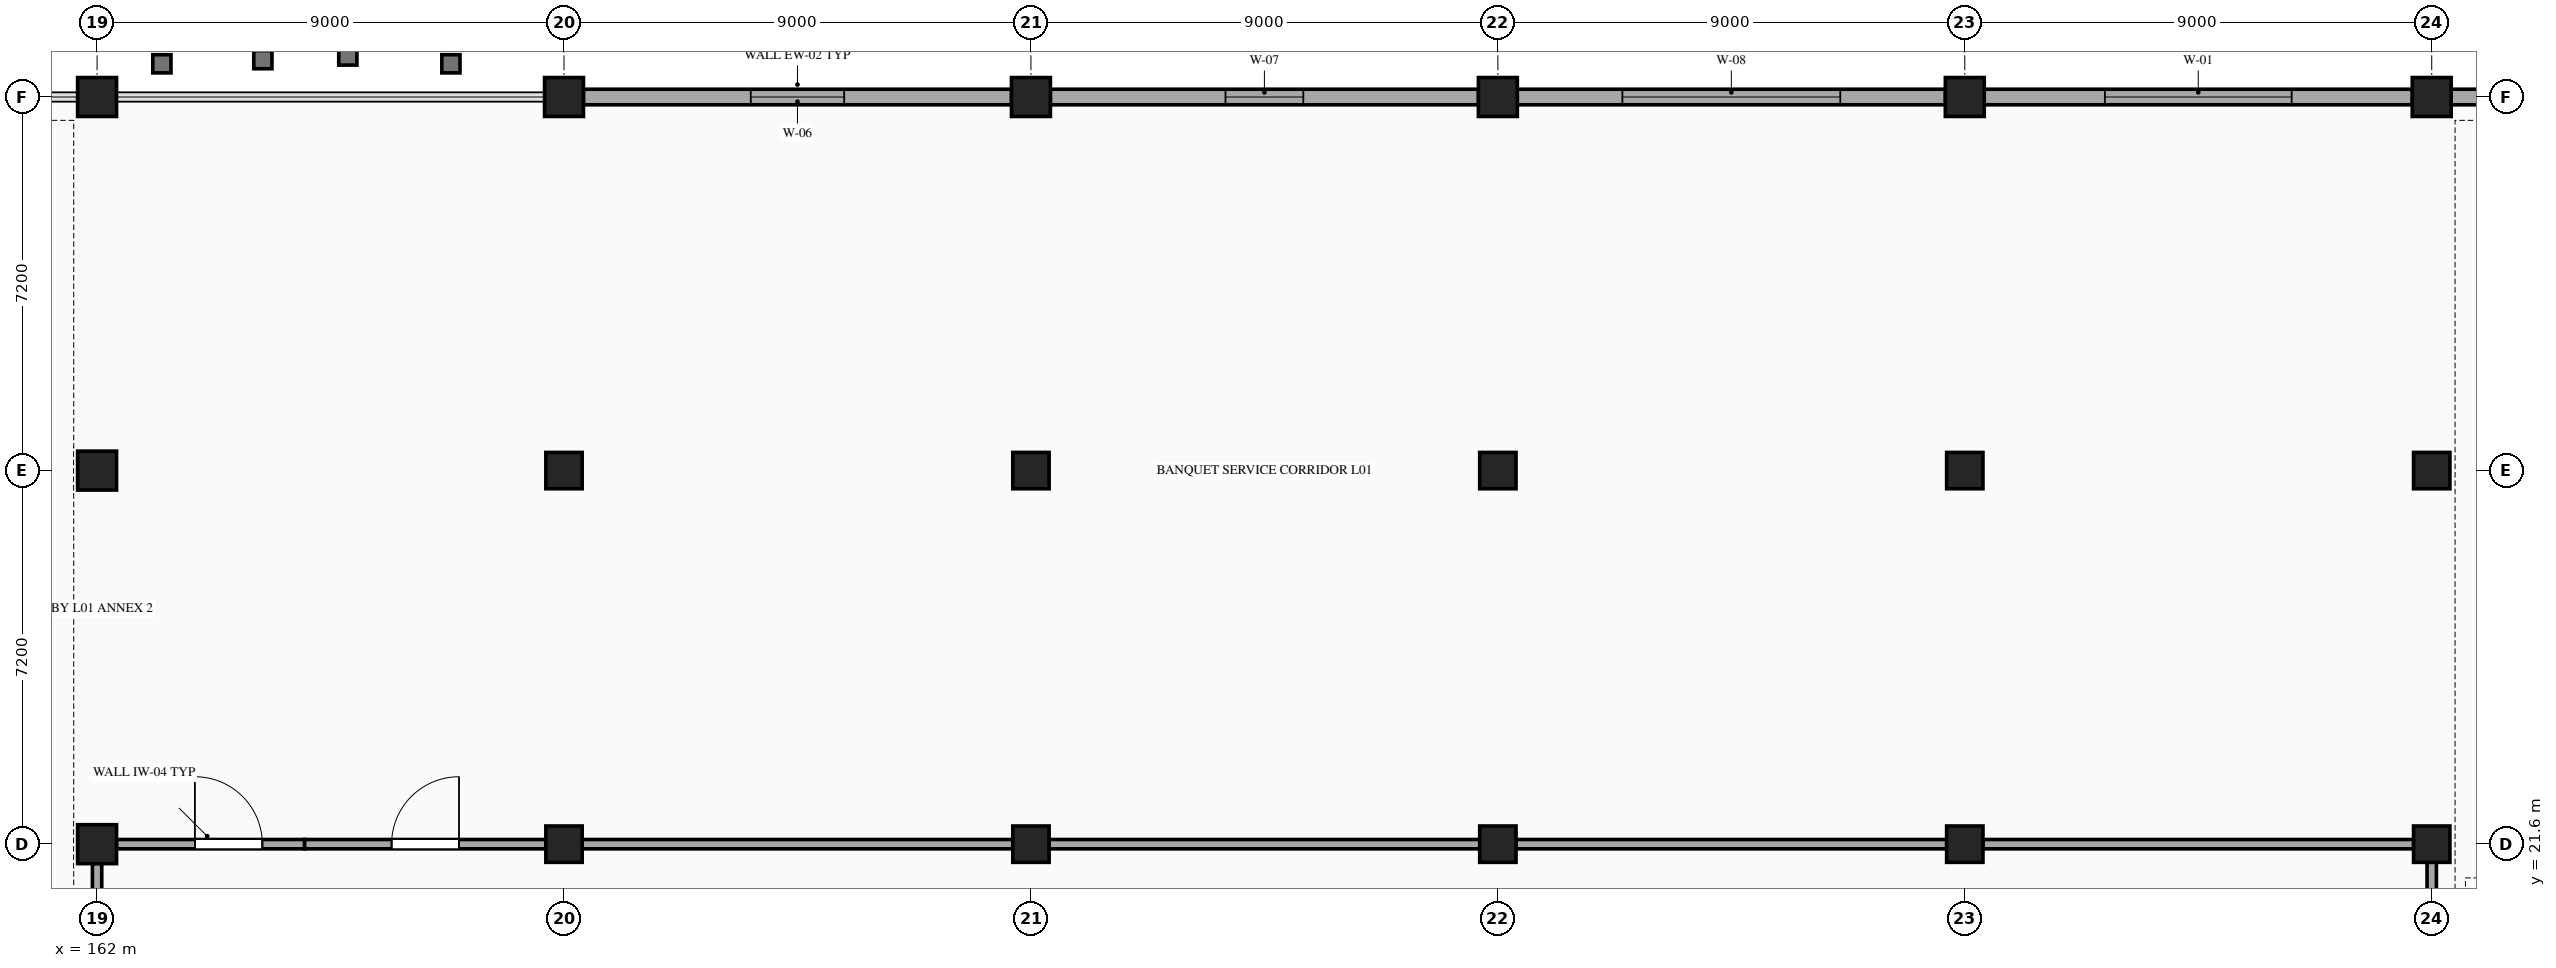
"""IFC4 building model, lengths in metres.
Left out: names, types, materials, properties, quantities, classifications, styles, units other than length and angle.
Written with IfcOpenShell. Run it as: python <this file> out.ifc"""

import sys

from ifc_helpers import new_model, si_unit, direction, frame, frame_2d, origin, origin_2d, place, context, subcontext, project, spatial, rectangle, extrude, element, fill, save


model = new_model("IFC4")
c1 = context("Model", 3, precision=1e-05, world=origin(), true_north=direction((0.0, 1.0)))
c2 = subcontext(c1, "Body", "Model", "MODEL_VIEW")
j1 = project(units=[si_unit("LENGTHUNIT", "METRE"), si_unit("PLANEANGLEUNIT", "RADIAN")], contexts=[c1])
p1 = place(None, origin())
s1 = spatial("IfcSite", under=j1, at=p1, CompositionType="ELEMENT")
p2 = place(p1, origin())
s2 = spatial("IfcBuilding", under=s1, at=p2, CompositionType="ELEMENT")
p3 = place(p2, frame((0.0, 0.0, 5.4)))
s3 = spatial("IfcBuildingStorey", under=s2, at=p3, CompositionType="ELEMENT", Elevation=5.4)
for number, where, z_axis, x_axis in (
    (1, (162.0, 21.6, 0.0), (0.0, 0.0, 1.0), (1.0, 0.0, 0.0)),
    (2, (162.0, 28.8, 0.0), (0.0, 0.0, 1.0), (1.0, 0.0, 0.0)),
    (3, (162.0, 36.0, 0.0), (0.0, 0.0, 1.0), (1.0, 0.0, 0.0)),
):
    element("IfcColumn", number, at=place(p3, frame(where, z_axis=z_axis, x_axis=x_axis)), inside=s3, PredefinedType="COLUMN", context=c2, shape_type="SweptSolid", body=[
        extrude(rectangle(XDim=0.75, YDim=0.75, at=origin_2d()), origin(), (0.0, 0.0, 1.0), 5.4),
    ])
for number, where, z_axis, x_axis in (
    (4, (171.0, 21.6, 0.0), (0.0, 0.0, 1.0), (1.0, 0.0, 0.0)),
    (5, (171.0, 28.8, 0.0), (0.0, 0.0, 1.0), (1.0, 0.0, 0.0)),
):
    element("IfcColumn", number, at=place(p3, frame(where, z_axis=z_axis, x_axis=x_axis)), inside=s3, PredefinedType="COLUMN", context=c2, shape_type="SweptSolid", body=[
        extrude(rectangle(XDim=0.7, YDim=0.7, at=origin_2d()), origin(), (0.0, 0.0, 1.0), 5.4),
    ])
p4 = place(p3, frame((171.0, 36.0, 0.0), z_axis=(0.0, 0.0, 1.0), x_axis=(1.0, 0.0, 0.0)))
e6 = element("IfcColumn", 6, at=p4, inside=s3, PredefinedType="COLUMN", context=c2, shape_type="SweptSolid", body=[
    extrude(rectangle(XDim=0.75, YDim=0.75, at=origin_2d()), origin(), (0.0, 0.0, 1.0), 5.4),
])
for number, where, z_axis, x_axis in (
    (7, (180.0, 21.6, 0.0), (0.0, 0.0, 1.0), (1.0, 0.0, 0.0)),
    (8, (180.0, 28.8, 0.0), (0.0, 0.0, 1.0), (1.0, 0.0, 0.0)),
):
    element("IfcColumn", number, at=place(p3, frame(where, z_axis=z_axis, x_axis=x_axis)), inside=s3, PredefinedType="COLUMN", context=c2, shape_type="SweptSolid", body=[
        extrude(rectangle(XDim=0.7, YDim=0.7, at=origin_2d()), origin(), (0.0, 0.0, 1.0), 5.4),
    ])
p5 = place(p3, frame((180.0, 36.0, 0.0), z_axis=(0.0, 0.0, 1.0), x_axis=(1.0, 0.0, 0.0)))
e9 = element("IfcColumn", 9, at=p5, inside=s3, PredefinedType="COLUMN", context=c2, shape_type="SweptSolid", body=[
    extrude(rectangle(XDim=0.75, YDim=0.75, at=origin_2d()), origin(), (0.0, 0.0, 1.0), 5.4),
])
for number, where, z_axis, x_axis in (
    (10, (189.0, 21.6, 0.0), (0.0, 0.0, 1.0), (1.0, 0.0, 0.0)),
    (11, (189.0, 28.8, 0.0), (0.0, 0.0, 1.0), (1.0, 0.0, 0.0)),
):
    element("IfcColumn", number, at=place(p3, frame(where, z_axis=z_axis, x_axis=x_axis)), inside=s3, PredefinedType="COLUMN", context=c2, shape_type="SweptSolid", body=[
        extrude(rectangle(XDim=0.7, YDim=0.7, at=origin_2d()), origin(), (0.0, 0.0, 1.0), 5.4),
    ])
p6 = place(p3, frame((189.0, 36.0, 0.0), z_axis=(0.0, 0.0, 1.0), x_axis=(1.0, 0.0, 0.0)))
e12 = element("IfcColumn", 12, at=p6, inside=s3, PredefinedType="COLUMN", context=c2, shape_type="SweptSolid", body=[
    extrude(rectangle(XDim=0.75, YDim=0.75, at=origin_2d()), origin(), (0.0, 0.0, 1.0), 5.4),
])
for number, where, z_axis, x_axis in (
    (13, (198.0, 21.6, 0.0), (0.0, 0.0, 1.0), (1.0, 0.0, 0.0)),
    (14, (198.0, 28.8, 0.0), (0.0, 0.0, 1.0), (1.0, 0.0, 0.0)),
):
    element("IfcColumn", number, at=place(p3, frame(where, z_axis=z_axis, x_axis=x_axis)), inside=s3, PredefinedType="COLUMN", context=c2, shape_type="SweptSolid", body=[
        extrude(rectangle(XDim=0.7, YDim=0.7, at=origin_2d()), origin(), (0.0, 0.0, 1.0), 5.4),
    ])
p7 = place(p3, frame((198.0, 36.0, 0.0), z_axis=(0.0, 0.0, 1.0), x_axis=(1.0, 0.0, 0.0)))
e15 = element("IfcColumn", 15, at=p7, inside=s3, PredefinedType="COLUMN", context=c2, shape_type="SweptSolid", body=[
    extrude(rectangle(XDim=0.75, YDim=0.75, at=origin_2d()), origin(), (0.0, 0.0, 1.0), 5.4),
])
for number, where, z_axis, x_axis in (
    (16, (207.0, 21.6, 0.0), (0.0, 0.0, 1.0), (1.0, 0.0, 0.0)),
    (17, (207.0, 28.8, 0.0), (0.0, 0.0, 1.0), (1.0, 0.0, 0.0)),
):
    element("IfcColumn", number, at=place(p3, frame(where, z_axis=z_axis, x_axis=x_axis)), inside=s3, PredefinedType="COLUMN", context=c2, shape_type="SweptSolid", body=[
        extrude(rectangle(XDim=0.7, YDim=0.7, at=origin_2d()), origin(), (0.0, 0.0, 1.0), 5.4),
    ])
p8 = place(p3, frame((207.0, 36.0, 0.0), z_axis=(0.0, 0.0, 1.0), x_axis=(1.0, 0.0, 0.0)))
e18 = element("IfcColumn", 18, at=p8, inside=s3, PredefinedType="COLUMN", context=c2, shape_type="SweptSolid", body=[
    extrude(rectangle(XDim=0.75, YDim=0.75, at=origin_2d()), origin(), (0.0, 0.0, 1.0), 5.4),
])
p9 = place(p3, frame((171.373, 36.0, 0.0), z_axis=(0.0, 0.0, 1.0), x_axis=(1.0, 0.0, 0.0)))
e19 = element("IfcWall", 19, at=p9, inside=s3, PredefinedType="STANDARD", context=c2, shape_type="SweptSolid", body=[
    extrude(rectangle(XDim=8.254, YDim=0.3, at=frame_2d((4.127, 0.0))), origin(), (0.0, 0.0, 1.0), 4.764),
])
p10 = place(p9, frame((3.227, 0.0, 0.9)))
e20 = element("IfcOpeningElement", 20, at=p10, cuts=e19, PredefinedType="OPENING", context=c2, shape_type="SweptSolid", body=[
    extrude(rectangle(XDim=1.8, YDim=1.8, at=frame_2d((0.9, 0.9))), frame((0.0, 0.16, 0.0), z_axis=(0.0, -1.0, 0.0), x_axis=(1.0, 0.0, 0.0)), (0.0, 0.0, 1.0), 0.32),
])
p11 = place(p3, frame((180.373, 36.0, 0.0), z_axis=(0.0, 0.0, 1.0), x_axis=(1.0, 0.0, 0.0)))
e21 = element("IfcWall", 21, at=p11, inside=s3, PredefinedType="STANDARD", context=c2, shape_type="SweptSolid", body=[
    extrude(rectangle(XDim=8.254, YDim=0.3, at=frame_2d((4.127, 0.0))), origin(), (0.0, 0.0, 1.0), 4.764),
])
p12 = place(p11, frame((3.377, 0.0, 0.9)))
e22 = element("IfcOpeningElement", 22, at=p12, cuts=e21, PredefinedType="OPENING", context=c2, shape_type="SweptSolid", body=[
    extrude(rectangle(XDim=1.5, YDim=1.6, at=frame_2d((0.75, 0.8))), frame((0.0, 0.16, 0.0), z_axis=(0.0, -1.0, 0.0), x_axis=(1.0, 0.0, 0.0)), (0.0, 0.0, 1.0), 0.32),
])
p13 = place(p3, frame((189.373, 36.0, 0.0), z_axis=(0.0, 0.0, 1.0), x_axis=(1.0, 0.0, 0.0)))
e23 = element("IfcWall", 23, at=p13, inside=s3, PredefinedType="STANDARD", context=c2, shape_type="SweptSolid", body=[
    extrude(rectangle(XDim=8.254, YDim=0.3, at=frame_2d((4.127, 0.0))), origin(), (0.0, 0.0, 1.0), 4.764),
])
p14 = place(p13, frame((2.027, 0.0, 0.9)))
e24 = element("IfcOpeningElement", 24, at=p14, cuts=e23, PredefinedType="OPENING", context=c2, shape_type="SweptSolid", body=[
    extrude(rectangle(XDim=4.2, YDim=1.5, at=frame_2d((2.1, 0.75))), frame((0.0, 0.16, 0.0), z_axis=(0.0, -1.0, 0.0), x_axis=(1.0, 0.0, 0.0)), (0.0, 0.0, 1.0), 0.32),
])
p15 = place(p3, frame((198.373, 36.0, 0.0), z_axis=(0.0, 0.0, 1.0), x_axis=(1.0, 0.0, 0.0)))
e25 = element("IfcWall", 25, at=p15, inside=s3, PredefinedType="STANDARD", context=c2, shape_type="SweptSolid", body=[
    extrude(rectangle(XDim=8.254, YDim=0.3, at=frame_2d((4.127, 0.0))), origin(), (0.0, 0.0, 1.0), 4.764),
])
p16 = place(p15, frame((2.327, 0.0, 0.9)))
e26 = element("IfcOpeningElement", 26, at=p16, cuts=e25, PredefinedType="OPENING", context=c2, shape_type="SweptSolid", body=[
    extrude(rectangle(XDim=3.6, YDim=2.1, at=frame_2d((1.8, 1.05))), frame((0.0, 0.16, 0.0), z_axis=(0.0, -1.0, 0.0), x_axis=(1.0, 0.0, 0.0)), (0.0, 0.0, 1.0), 0.32),
])
p17 = place(p3, frame((207.373, 36.0, 0.0), z_axis=(0.0, 0.0, 1.0), x_axis=(1.0, 0.0, 0.0)))
e27 = element("IfcWall", 27, at=p17, inside=s3, PredefinedType="STANDARD", context=c2, shape_type="SweptSolid", body=[
    extrude(rectangle(XDim=8.254, YDim=0.3, at=frame_2d((4.127, 0.0))), origin(), (0.0, 0.0, 1.0), 4.764),
])
p18 = place(p17, frame((2.627, 0.0, 0.9)))
e28 = element("IfcOpeningElement", 28, at=p18, cuts=e27, PredefinedType="OPENING", context=c2, shape_type="SweptSolid", body=[
    extrude(rectangle(XDim=3.0, YDim=2.1, at=frame_2d((1.5, 1.05))), frame((0.0, 0.16, 0.0), z_axis=(0.0, -1.0, 0.0), x_axis=(1.0, 0.0, 0.0)), (0.0, 0.0, 1.0), 0.32),
])
p19 = place(p3, frame((162.373, 21.6, 0.0), z_axis=(0.0, 0.0, 1.0), x_axis=(1.0, 0.0, 0.0)))
e29 = element("IfcWall", 29, at=p19, inside=s3, PredefinedType="PARTITIONING", context=c2, shape_type="SweptSolid", body=[
    extrude(rectangle(XDim=3.627, YDim=0.18, at=frame_2d((1.813, 0.0))), origin(), (0.0, 0.0, 1.0), 4.264),
])
p20 = place(p19, frame((1.513, 0.0, 0.0)))
e30 = element("IfcOpeningElement", 30, at=p20, cuts=e29, PredefinedType="OPENING", context=c2, shape_type="SweptSolid", body=[
    extrude(rectangle(XDim=1.3, YDim=2.2, at=frame_2d((0.65, 1.1))), frame((0.0, 0.1, 0.0), z_axis=(0.0, -1.0, 0.0), x_axis=(1.0, 0.0, 0.0)), (0.0, 0.0, 1.0), 0.2),
])
p21 = place(p3, frame((166.0, 21.6, 0.0), z_axis=(0.0, 0.0, 1.0), x_axis=(1.0, 0.0, 0.0)))
e31 = element("IfcWall", 31, at=p21, inside=s3, PredefinedType="PARTITIONING", context=c2, shape_type="SweptSolid", body=[
    extrude(rectangle(XDim=4.652, YDim=0.18, at=frame_2d((2.326, 0.0))), origin(), (0.0, 0.0, 1.0), 4.264),
])
p22 = place(p21, frame((1.676, 0.0, 0.0)))
e32 = element("IfcOpeningElement", 32, at=p22, cuts=e31, PredefinedType="OPENING", context=c2, shape_type="SweptSolid", body=[
    extrude(rectangle(XDim=1.3, YDim=2.2, at=frame_2d((0.65, 1.1))), frame((0.0, 0.1, 0.0), z_axis=(0.0, -1.0, 0.0), x_axis=(1.0, 0.0, 0.0)), (0.0, 0.0, 1.0), 0.2),
])
for number, where, z_axis, x_axis in (
    (33, (171.348, 21.6, 0.0), (0.0, 0.0, 1.0), (1.0, 0.0, 0.0)),
    (34, (180.348, 21.6, 0.0), (0.0, 0.0, 1.0), (1.0, 0.0, 0.0)),
    (35, (189.348, 21.6, 0.0), (0.0, 0.0, 1.0), (1.0, 0.0, 0.0)),
    (36, (198.348, 21.6, 0.0), (0.0, 0.0, 1.0), (1.0, 0.0, 0.0)),
):
    element("IfcWall", number, at=place(p3, frame(where, z_axis=z_axis, x_axis=x_axis)), inside=s3, PredefinedType="PARTITIONING", context=c2, shape_type="SweptSolid", body=[
        extrude(rectangle(XDim=8.304, YDim=0.18, at=frame_2d((4.152, 0.0))), origin(), (0.0, 0.0, 1.0), 4.264),
    ])
p23 = place(p3, frame((162.0, 14.773, 0.0), z_axis=(0.0, 0.0, 1.0), x_axis=(0.0, 1.0, 0.0)))
e37 = element("IfcWall", 37, at=p23, inside=s3, PredefinedType="PARTITIONING", context=c2, shape_type="SweptSolid", body=[
    extrude(rectangle(XDim=6.454, YDim=0.18, at=frame_2d((3.227, 0.0))), origin(), (0.0, 0.0, 1.0), 4.264),
])
p24 = place(p3, frame((207.0, 14.748, 0.0), z_axis=(0.0, 0.0, 1.0), x_axis=(0.0, 1.0, 0.0)))
e38 = element("IfcWall", 38, at=p24, inside=s3, PredefinedType="PARTITIONING", context=c2, shape_type="SweptSolid", body=[
    extrude(rectangle(XDim=6.504, YDim=0.18, at=frame_2d((3.252, 0.0))), origin(), (0.0, 0.0, 1.0), 4.264),
])
p25 = place(p10, origin())
e39 = element("IfcWindow", 39, at=p25, inside=s3, PartitioningType="SINGLE_PANEL", PredefinedType="WINDOW", context=c2, shape_type="SweptSolid", body=[
    extrude(rectangle(XDim=1.8, YDim=1.8, at=frame_2d((0.9, 0.9))), frame((0.0, 0.03, 0.0), z_axis=(0.0, -1.0, 0.0), x_axis=(1.0, 0.0, 0.0)), (0.0, 0.0, 1.0), 0.06),
])
fill(e20, e39)
p26 = place(p12, origin())
e40 = element("IfcWindow", 40, at=p26, inside=s3, PartitioningType="SINGLE_PANEL", PredefinedType="WINDOW", context=c2, shape_type="SweptSolid", body=[
    extrude(rectangle(XDim=1.5, YDim=1.6, at=frame_2d((0.75, 0.8))), frame((0.0, 0.03, 0.0), z_axis=(0.0, -1.0, 0.0), x_axis=(1.0, 0.0, 0.0)), (0.0, 0.0, 1.0), 0.06),
])
fill(e22, e40)
p27 = place(p14, origin())
e41 = element("IfcWindow", 41, at=p27, inside=s3, PartitioningType="SINGLE_PANEL", PredefinedType="WINDOW", context=c2, shape_type="SweptSolid", body=[
    extrude(rectangle(XDim=4.2, YDim=1.5, at=frame_2d((2.1, 0.75))), frame((0.0, 0.03, 0.0), z_axis=(0.0, -1.0, 0.0), x_axis=(1.0, 0.0, 0.0)), (0.0, 0.0, 1.0), 0.06),
])
fill(e24, e41)
p28 = place(p16, origin())
e42 = element("IfcWindow", 42, at=p28, inside=s3, PartitioningType="SINGLE_PANEL", PredefinedType="WINDOW", context=c2, shape_type="SweptSolid", body=[
    extrude(rectangle(XDim=3.6, YDim=2.1, at=frame_2d((1.8, 1.05))), frame((0.0, 0.03, 0.0), z_axis=(0.0, -1.0, 0.0), x_axis=(1.0, 0.0, 0.0)), (0.0, 0.0, 1.0), 0.06),
])
fill(e26, e42)
p29 = place(p20, origin())
e43 = element("IfcDoor", 43, at=p29, inside=s3, OperationType="SINGLE_SWING_LEFT", PredefinedType="DOOR", context=c2, shape_type="SweptSolid", body=[
    extrude(rectangle(XDim=1.3, YDim=2.2, at=frame_2d((0.65, 1.1))), frame((0.0, 0.025, 0.0), z_axis=(0.0, -1.0, 0.0), x_axis=(1.0, 0.0, 0.0)), (0.0, 0.0, 1.0), 0.05),
])
fill(e30, e43)
p30 = place(p22, origin())
e44 = element("IfcDoor", 44, at=p30, inside=s3, OperationType="SINGLE_SWING_RIGHT", PredefinedType="DOOR", context=c2, shape_type="SweptSolid", body=[
    extrude(rectangle(XDim=1.3, YDim=2.2, at=frame_2d((0.65, 1.1))), frame((0.0, 0.025, 0.0), z_axis=(0.0, -1.0, 0.0), x_axis=(1.0, 0.0, 0.0)), (0.0, 0.0, 1.0), 0.05),
])
fill(e32, e44)
save(model, sys.argv[1])
